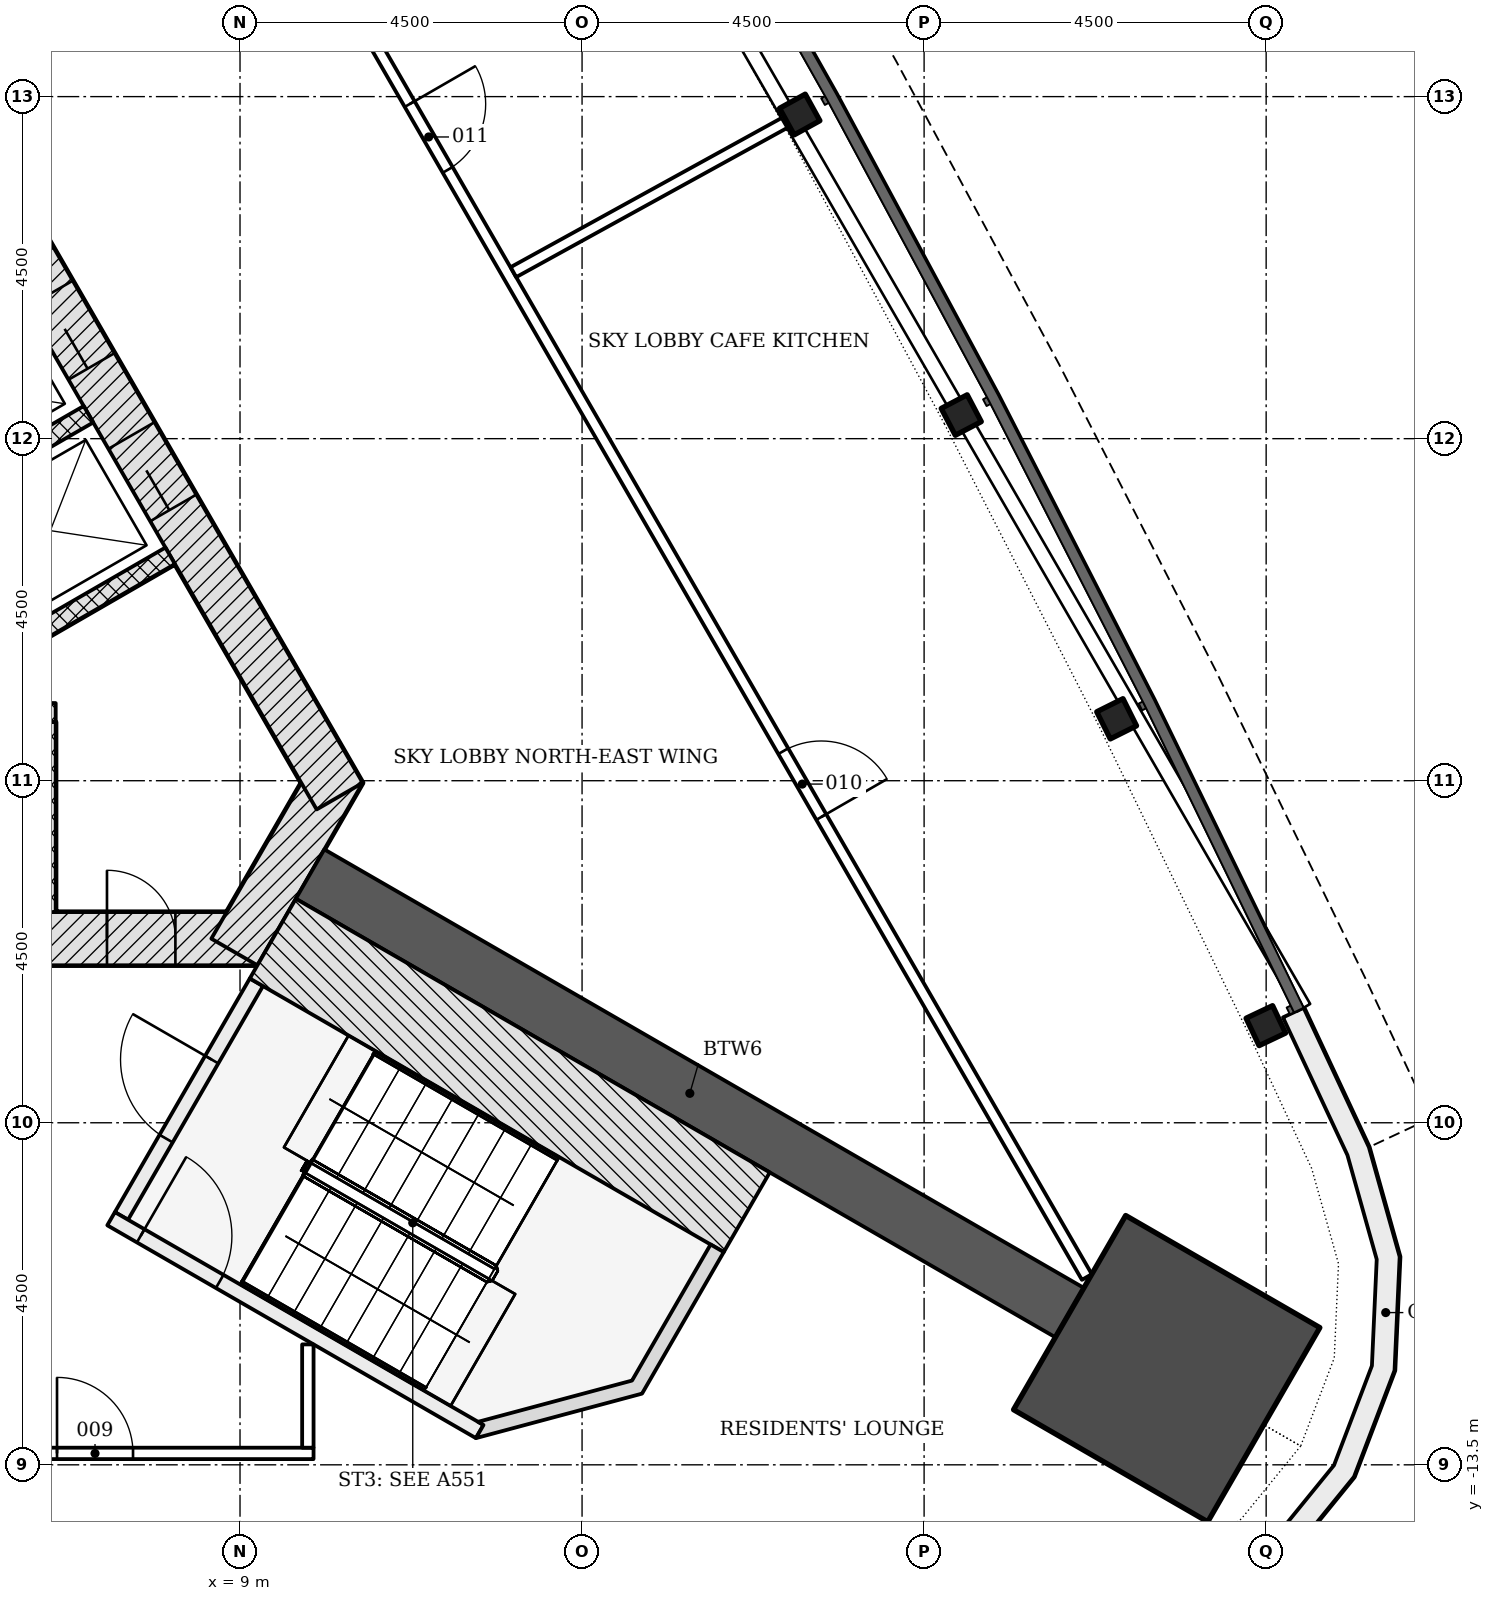
"""IFC4 building model, lengths in metres.
Left out: names, types, materials, properties, quantities, classifications, styles, units other than length and angle.
Written with IfcOpenShell. Run it as: python <this file> out.ifc"""

import sys

from ifc_helpers import new_model, si_unit, direction, frame, frame_2d, origin, origin_2d, place, context, subcontext, project, spatial, polyline, rectangle, i_section, outline, extrude, element, fill, save


model = new_model("IFC4")
c1 = context("Model", 3, precision=1e-05, world=origin(), true_north=direction((0.0, 1.0)))
c2 = subcontext(c1, "Body", "Model", "MODEL_VIEW")
j1 = project(units=[si_unit("LENGTHUNIT", "METRE"), si_unit("PLANEANGLEUNIT", "RADIAN")], contexts=[c1])
p1 = place(None, origin())
s1 = spatial("IfcSite", under=j1, at=p1, CompositionType="ELEMENT")
p2 = place(p1, origin())
s2 = spatial("IfcBuilding", under=s1, at=p2, CompositionType="ELEMENT")
p3 = place(p2, frame((0.0, 0.0, 134.7)))
s3 = spatial("IfcBuildingStorey", under=s2, at=p3, CompositionType="ELEMENT", Elevation=134.7)
p4 = place(p3, frame((-9.229, -6.578, -0.3), z_axis=(0.0, 0.0, 1.0), x_axis=(1.0, 0.0, 0.0)))
e1 = element("IfcWall", 1, at=p4, inside=s3, PredefinedType="SHEAR", context=c2, shape_type="SweptSolid", body=[
    extrude(rectangle(XDim=18.458, YDim=0.7, at=frame_2d((9.229, 0.0))), origin(), (0.0, 0.0, 1.0), 5.5),
])
p5 = place(p4, frame((3.304, 0.0, 0.3)))
e2 = element("IfcOpeningElement", 2, at=p5, cuts=e1, PredefinedType="OPENING", context=c2, shape_type="SweptSolid", body=[
    extrude(rectangle(XDim=1.1, YDim=2.1, at=frame_2d((0.55, 1.05))), frame((0.0, 0.36, 0.0), z_axis=(0.0, -1.0, 0.0), x_axis=(1.0, 0.0, 0.0)), (0.0, 0.0, 1.0), 0.72),
])
p6 = place(p4, frame((5.454, 0.0, 0.3)))
e3 = element("IfcOpeningElement", 3, at=p6, cuts=e1, PredefinedType="OPENING", context=c2, shape_type="SweptSolid", body=[
    extrude(rectangle(XDim=1.1, YDim=2.1, at=frame_2d((0.55, 1.05))), frame((0.0, 0.36, 0.0), z_axis=(0.0, -1.0, 0.0), x_axis=(1.0, 0.0, 0.0)), (0.0, 0.0, 1.0), 0.72),
])
p7 = place(p4, frame((7.604, 0.0, 0.3)))
e4 = element("IfcOpeningElement", 4, at=p7, cuts=e1, PredefinedType="OPENING", context=c2, shape_type="SweptSolid", body=[
    extrude(rectangle(XDim=1.1, YDim=2.1, at=frame_2d((0.55, 1.05))), frame((0.0, 0.36, 0.0), z_axis=(0.0, -1.0, 0.0), x_axis=(1.0, 0.0, 0.0)), (0.0, 0.0, 1.0), 0.72),
])
p8 = place(p4, frame((9.754, 0.0, 0.3)))
e5 = element("IfcOpeningElement", 5, at=p8, cuts=e1, PredefinedType="OPENING", context=c2, shape_type="SweptSolid", body=[
    extrude(rectangle(XDim=1.1, YDim=2.1, at=frame_2d((0.55, 1.05))), frame((0.0, 0.36, 0.0), z_axis=(0.0, -1.0, 0.0), x_axis=(1.0, 0.0, 0.0)), (0.0, 0.0, 1.0), 0.72),
])
p9 = place(p4, frame((11.904, 0.0, 0.3)))
e6 = element("IfcOpeningElement", 6, at=p9, cuts=e1, PredefinedType="OPENING", context=c2, shape_type="SweptSolid", body=[
    extrude(rectangle(XDim=1.1, YDim=2.1, at=frame_2d((0.55, 1.05))), frame((0.0, 0.36, 0.0), z_axis=(0.0, -1.0, 0.0), x_axis=(1.0, 0.0, 0.0)), (0.0, 0.0, 1.0), 0.72),
])
p10 = place(p4, frame((14.054, 0.0, 0.3)))
e7 = element("IfcOpeningElement", 7, at=p10, cuts=e1, PredefinedType="OPENING", context=c2, shape_type="SweptSolid", body=[
    extrude(rectangle(XDim=1.1, YDim=2.1, at=frame_2d((0.55, 1.05))), frame((0.0, 0.36, 0.0), z_axis=(0.0, -1.0, 0.0), x_axis=(1.0, 0.0, 0.0)), (0.0, 0.0, 1.0), 0.72),
])
p11 = place(p4, frame((1.0, 0.0, 0.3)))
e8 = element("IfcOpeningElement", 8, at=p11, cuts=e1, PredefinedType="OPENING", context=c2, shape_type="SweptSolid", body=[
    extrude(rectangle(XDim=1.0, YDim=2.1, at=frame_2d((0.5, 1.05))), frame((0.0, 0.36, 0.0), z_axis=(0.0, -1.0, 0.0), x_axis=(1.0, 0.0, 0.0)), (0.0, 0.0, 1.0), 0.72),
])
p12 = place(p4, frame((16.479, 0.0, 0.3)))
e9 = element("IfcOpeningElement", 9, at=p12, cuts=e1, PredefinedType="OPENING", context=c2, shape_type="SweptSolid", body=[
    extrude(rectangle(XDim=0.9, YDim=2.1, at=frame_2d((0.45, 1.05))), frame((0.0, 0.36, 0.0), z_axis=(0.0, -1.0, 0.0), x_axis=(1.0, 0.0, 0.0)), (0.0, 0.0, 1.0), 0.72),
])
p13 = place(p3, frame((8.926, -6.753, -0.3), z_axis=(0.0, 0.0, 1.0), x_axis=(0.500042739161, 0.866000726912, 0.0)))
e10 = element("IfcWall", 10, at=p13, inside=s3, PredefinedType="SHEAR", context=c2, shape_type="SweptSolid", body=[
    extrude(rectangle(XDim=2.771, YDim=0.7, at=frame_2d((1.386, 0.0))), origin(), (0.0, 0.0, 1.0), 5.5),
])
p14 = place(p3, frame((10.311, -4.703, -0.3), z_axis=(0.0, 0.0, 1.0), x_axis=(-0.500001446645, 0.866024568562, 0.0)))
e11 = element("IfcWall", 11, at=p14, inside=s3, PredefinedType="SHEAR", context=c2, shape_type="SweptSolid", body=[
    extrude(rectangle(XDim=18.458, YDim=0.7, at=frame_2d((9.229, 0.0))), origin(), (0.0, 0.0, 1.0), 5.5),
])
p15 = place(p14, frame((4.379, 0.0, 0.3)))
e12 = element("IfcOpeningElement", 12, at=p15, cuts=e11, PredefinedType="OPENING", context=c2, shape_type="SweptSolid", body=[
    extrude(rectangle(XDim=1.1, YDim=2.1, at=frame_2d((0.55, 1.05))), frame((0.0, 0.36, 0.0), z_axis=(0.0, -1.0, 0.0), x_axis=(1.0, 0.0, 0.0)), (0.0, 0.0, 1.0), 0.72),
])
p16 = place(p14, frame((6.529, 0.0, 0.3)))
e13 = element("IfcOpeningElement", 13, at=p16, cuts=e11, PredefinedType="OPENING", context=c2, shape_type="SweptSolid", body=[
    extrude(rectangle(XDim=1.1, YDim=2.1, at=frame_2d((0.55, 1.05))), frame((0.0, 0.36, 0.0), z_axis=(0.0, -1.0, 0.0), x_axis=(1.0, 0.0, 0.0)), (0.0, 0.0, 1.0), 0.72),
])
p17 = place(p14, frame((8.679, 0.0, 0.3)))
e14 = element("IfcOpeningElement", 14, at=p17, cuts=e11, PredefinedType="OPENING", context=c2, shape_type="SweptSolid", body=[
    extrude(rectangle(XDim=1.1, YDim=2.1, at=frame_2d((0.55, 1.05))), frame((0.0, 0.36, 0.0), z_axis=(0.0, -1.0, 0.0), x_axis=(1.0, 0.0, 0.0)), (0.0, 0.0, 1.0), 0.72),
])
p18 = place(p14, frame((10.829, 0.0, 0.3)))
e15 = element("IfcOpeningElement", 15, at=p18, cuts=e11, PredefinedType="OPENING", context=c2, shape_type="SweptSolid", body=[
    extrude(rectangle(XDim=1.1, YDim=2.1, at=frame_2d((0.55, 1.05))), frame((0.0, 0.36, 0.0), z_axis=(0.0, -1.0, 0.0), x_axis=(1.0, 0.0, 0.0)), (0.0, 0.0, 1.0), 0.72),
])
p19 = place(p14, frame((12.979, 0.0, 0.3)))
e16 = element("IfcOpeningElement", 16, at=p19, cuts=e11, PredefinedType="OPENING", context=c2, shape_type="SweptSolid", body=[
    extrude(rectangle(XDim=1.1, YDim=2.1, at=frame_2d((0.55, 1.05))), frame((0.0, 0.36, 0.0), z_axis=(0.0, -1.0, 0.0), x_axis=(1.0, 0.0, 0.0)), (0.0, 0.0, 1.0), 0.72),
])
p20 = place(p3, frame((9.922, -5.728, -0.3), z_axis=(0.0, 0.0, 1.0), x_axis=(0.866024913782, -0.500000848707, 0.0)))
e17 = element("IfcWall", 17, at=p20, inside=s3, PredefinedType="SHEAR", context=c2, shape_type="SweptSolid", body=[
    extrude(rectangle(XDim=11.539, YDim=0.75, at=frame_2d((5.769, 0.0))), origin(), (0.0, 0.0, 1.0), 5.5),
])
p21 = place(p3, frame((21.192, -12.235, -0.3), z_axis=(0.0, 0.0, 1.0), x_axis=(0.866025403784, -0.5, 0.0)))
e18 = element("IfcColumn", 18, at=p21, inside=s3, PredefinedType="COLUMN", context=c2, shape_type="SweptSolid", body=[
    extrude(rectangle(XDim=2.95, YDim=2.95, at=origin_2d()), origin(), (0.0, 0.0, 1.0), 5.5),
])
for number, where, z_axis, x_axis in (
    (19, (22.496, -7.722, -0.3), (0.0, 0.0, 1.0), (-0.428, 0.904, 0.0)),
    (20, (20.533, -3.686, -0.3), (0.0, 0.0, 1.0), (-0.446, 0.895, 0.0)),
    (21, (18.489, 0.311, -0.3), (0.0, 0.0, 1.0), (-0.464, 0.886, 0.0)),
    (22, (16.364, 4.265, -0.3), (0.0, 0.0, 1.0), (-0.482, 0.876, 0.0)),
):
    element("IfcColumn", number, at=place(p3, frame(where, z_axis=z_axis, x_axis=x_axis)), inside=s3, PredefinedType="COLUMN", context=c2, shape_type="SweptSolid", body=[
        extrude(i_section(OverallWidth=0.399, OverallDepth=0.386, WebThickness=0.021, FlangeThickness=0.033, FilletRadius=0.015, at=origin_2d()), origin(), (0.0, 0.0, 1.0), 5.5),
    ])
p22 = place(p3, origin())
e23 = element("IfcWall", 23, at=p22, inside=s3, PredefinedType="NOTDEFINED", context=c2, shape_type="SweptSolid", body=[
    extrude(outline(polyline([(17.98, -16.169), (19.999, -15.995), (21.449, -15.625), (22.711, -14.819), (23.656, -13.658), (24.189, -12.259), (24.257, -10.763), (23.852, -9.322), (22.993, -7.487), (22.721, -7.614), (23.57, -9.426), (23.955, -10.798), (23.891, -12.197), (23.393, -13.506), (22.509, -14.592), (21.328, -15.347), (19.948, -15.699), (17.955, -15.87), (17.98, -16.169)])), origin(), (0.0, 0.0, 1.0), 5.2),
])
p23 = place(p3, frame((6.45, -6.228, -0.3), z_axis=(0.0, 0.0, 1.0), x_axis=(0.0, 1.0, 0.0)))
e24 = element("IfcWall", 24, at=p23, inside=s3, PredefinedType="PARTITIONING", context=c2, shape_type="SweptSolid", body=[
    extrude(rectangle(XDim=2.5, YDim=0.25, at=frame_2d((1.25, 0.0))), origin(), (0.0, 0.0, 1.0), 5.5),
])
p24 = place(p3, frame((-6.575, -3.603, 0.0), z_axis=(0.0, 0.0, 1.0), x_axis=(1.0, 0.0, 0.0)))
e25 = element("IfcWall", 25, at=p24, inside=s3, PredefinedType="PARTITIONING", context=c2, shape_type="SweptSolid", body=[
    extrude(rectangle(XDim=13.15, YDim=0.25, at=frame_2d((6.575, 0.0))), origin(), (0.0, 0.0, 1.0), 5.2),
])
for number, where, z_axis, x_axis in (
    (26, (8.081, -1.541, -0.3), (0.0, 0.0, 1.0), (-0.866, -0.5, 0.0)),
    (27, (7.006, 0.321, -0.3), (0.0, 0.0, 1.0), (-0.866, -0.5, 0.0)),
):
    element("IfcWall", number, at=place(p3, frame(where, z_axis=z_axis, x_axis=x_axis)), inside=s3, PredefinedType="PARTITIONING", context=c2, shape_type="SweptSolid", body=[
        extrude(rectangle(XDim=2.5, YDim=0.25, at=frame_2d((1.25, 0.0))), origin(), (0.0, 0.0, 1.0), 5.5),
    ])
p25 = place(p3, frame((7.44, -10.226, -0.3), z_axis=(0.0, 0.0, 1.0), x_axis=(0.500022077904, 0.866012656725, 0.0)))
e28 = element("IfcWall", 28, at=p25, inside=s3, PredefinedType="SHEAR", context=c2, shape_type="SweptSolid", body=[
    extrude(rectangle(XDim=3.55, YDim=0.2, at=frame_2d((1.775, 0.0))), origin(), (0.0, 0.0, 1.0), 5.5),
])
p26 = place(p25, frame((1.175, 0.0, 0.3)))
e29 = element("IfcOpeningElement", 29, at=p26, cuts=e28, PredefinedType="OPENING", context=c2, shape_type="SweptSolid", body=[
    extrude(rectangle(XDim=1.2, YDim=2.1, at=frame_2d((0.6, 1.05))), frame((0.0, 0.11, 0.0), z_axis=(0.0, -1.0, 0.0), x_axis=(1.0, 0.0, 0.0)), (0.0, 0.0, 1.0), 0.22),
])
p27 = place(p3, frame((7.304, -10.262, -0.3), z_axis=(0.0, 0.0, 1.0), x_axis=(0.866026594901, -0.49999793692, 0.0)))
e30 = element("IfcWall", 30, at=p27, inside=s3, PredefinedType="SHEAR", context=c2, shape_type="SweptSolid", body=[
    extrude(rectangle(XDim=5.6, YDim=0.2, at=frame_2d((2.8, 0.0))), origin(), (0.0, 0.0, 1.0), 5.5),
])
p28 = place(p27, frame((0.45, 0.0, 0.3)))
e31 = element("IfcOpeningElement", 31, at=p28, cuts=e30, PredefinedType="OPENING", context=c2, shape_type="SweptSolid", body=[
    extrude(rectangle(XDim=1.2, YDim=2.1, at=frame_2d((0.6, 1.05))), frame((0.0, 0.11, 0.0), z_axis=(0.0, -1.0, 0.0), x_axis=(1.0, 0.0, 0.0)), (0.0, 0.0, 1.0), 0.22),
])
p29 = place(p3, frame((9.431, -6.577, -0.3), z_axis=(0.0, 0.0, 1.0), x_axis=(0.866018442252, -0.500012057535, 0.0)))
e32 = element("IfcWall", 32, at=p29, inside=s3, PredefinedType="SHEAR", context=c2, shape_type="SweptSolid", body=[
    extrude(rectangle(XDim=7.2, YDim=1.211, at=frame_2d((3.6, 0.0))), origin(), (0.0, 0.0, 1.0), 5.5),
])
p30 = place(p3, frame((0.0, 0.0, -0.3)))
e33 = element("IfcWall", 33, at=p30, inside=s3, PredefinedType="SHEAR", context=c2, shape_type="SweptSolid", body=[
    extrude(outline(polyline([(12.104, -13.149), (14.289, -12.563), (15.364, -10.701), (15.191, -10.601), (14.157, -12.392), (12.132, -12.934), (12.204, -12.976), (12.204, -12.976), (12.204, -12.976), (12.204, -12.976), (12.204, -12.976), (12.204, -12.976), (12.204, -12.976), (12.204, -12.976), (12.204, -12.976), (12.204, -12.976), (12.204, -12.976), (12.204, -12.976), (12.204, -12.976), (12.204, -12.976), (12.204, -12.976), (12.204, -12.976), (12.204, -12.976), (12.104, -13.149)])), origin(), (0.0, 0.0, 1.0), 5.5),
])
p31 = place(p3, frame((5.909, -13.35, 0.0), z_axis=(0.0, 0.0, 1.0), x_axis=(1.0, 0.0, 0.0)))
e34 = element("IfcWall", 34, at=p31, inside=s3, PredefinedType="PARTITIONING", context=c2, shape_type="SweptSolid", body=[
    extrude(rectangle(XDim=4.059, YDim=0.15, at=frame_2d((2.029, 0.0))), origin(), (0.0, 0.0, 1.0), 4.723),
])
p32 = place(p31, frame((0.684, 0.0, 0.0)))
e35 = element("IfcOpeningElement", 35, at=p32, cuts=e34, PredefinedType="OPENING", context=c2, shape_type="SweptSolid", body=[
    extrude(rectangle(XDim=1.0, YDim=2.1, at=frame_2d((0.5, 1.05))), frame((0.0, 0.085, 0.0), z_axis=(0.0, -1.0, 0.0), x_axis=(1.0, 0.0, 0.0)), (0.0, 0.0, 1.0), 0.17),
])
p33 = place(p3, frame((9.893, -13.275, 0.0), z_axis=(0.0, 0.0, 1.0), x_axis=(0.0, 1.0, 0.0)))
e36 = element("IfcWall", 36, at=p33, inside=s3, PredefinedType="PARTITIONING", context=c2, shape_type="SweptSolid", body=[
    extrude(rectangle(XDim=1.359, YDim=0.15, at=frame_2d((0.68, 0.0))), origin(), (0.0, 0.0, 1.0), 5.2),
])
p34 = place(p3, frame((7.377, 11.079, 0.0), z_axis=(0.0, 0.0, 1.0), x_axis=(0.500006395474, -0.866021711325, 0.0)))
e37 = element("IfcWall", 37, at=p34, inside=s3, PredefinedType="PARTITIONING", context=c2, shape_type="SweptSolid", body=[
    extrude(rectangle(XDim=25.529, YDim=0.15, at=frame_2d((12.765, 0.0))), origin(), (0.0, 0.0, 1.0), 4.647),
])
p35 = place(p34, frame((17.541, 0.0, 0.0)))
e38 = element("IfcOpeningElement", 38, at=p35, cuts=e37, PredefinedType="OPENING", context=c2, shape_type="SweptSolid", body=[
    extrude(rectangle(XDim=1.0, YDim=2.1, at=frame_2d((0.5, 1.05))), frame((0.0, 0.085, 0.0), z_axis=(0.0, -1.0, 0.0), x_axis=(1.0, 0.0, 0.0)), (0.0, 0.0, 1.0), 0.17),
])
p36 = place(p34, frame((7.71, 0.0, 0.0)))
e39 = element("IfcOpeningElement", 39, at=p36, cuts=e37, PredefinedType="OPENING", context=c2, shape_type="SweptSolid", body=[
    extrude(rectangle(XDim=1.0, YDim=2.1, at=frame_2d((0.5, 1.05))), frame((0.0, 0.085, 0.0), z_axis=(0.0, -1.0, 0.0), x_axis=(1.0, 0.0, 0.0)), (0.0, 0.0, 1.0), 0.17),
])
p37 = place(p34, frame((3.311, 0.0, 0.0)))
e40 = element("IfcOpeningElement", 40, at=p37, cuts=e37, PredefinedType="OPENING", context=c2, shape_type="SweptSolid", body=[
    extrude(rectangle(XDim=1.0, YDim=2.1, at=frame_2d((0.5, 1.05))), frame((0.0, 0.085, 0.0), z_axis=(0.0, -1.0, 0.0), x_axis=(1.0, 0.0, 0.0)), (0.0, 0.0, 1.0), 0.17),
])
p38 = place(p3, frame((12.597, 2.191, 0.0), z_axis=(0.0, 0.0, 1.0), x_axis=(0.875990873932, 0.482327677816, 0.0)))
e41 = element("IfcWall", 41, at=p38, inside=s3, PredefinedType="PARTITIONING", context=c2, shape_type="SweptSolid", body=[
    extrude(rectangle(XDim=4.125, YDim=0.15, at=frame_2d((2.062, 0.0))), origin(), (0.0, 0.0, 1.0), 4.647),
])
p39 = place(p15, origin())
e42 = element("IfcDoor", 42, at=p39, inside=s3, OperationType="DOUBLE_DOOR_SLIDING", PredefinedType="DOOR", context=c2, shape_type="SweptSolid", body=[
    extrude(rectangle(XDim=1.1, YDim=2.1, at=frame_2d((0.55, 1.05))), frame((0.0, 0.025, 0.0), z_axis=(0.0, -1.0, 0.0), x_axis=(1.0, 0.0, 0.0)), (0.0, 0.0, 1.0), 0.05),
])
fill(e12, e42)
p40 = place(p16, origin())
e43 = element("IfcDoor", 43, at=p40, inside=s3, OperationType="DOUBLE_DOOR_SLIDING", PredefinedType="DOOR", context=c2, shape_type="SweptSolid", body=[
    extrude(rectangle(XDim=1.1, YDim=2.1, at=frame_2d((0.55, 1.05))), frame((0.0, 0.025, 0.0), z_axis=(0.0, -1.0, 0.0), x_axis=(1.0, 0.0, 0.0)), (0.0, 0.0, 1.0), 0.05),
])
fill(e13, e43)
p41 = place(p12, origin())
e44 = element("IfcDoor", 44, at=p41, inside=s3, OperationType="SINGLE_SWING_LEFT", PredefinedType="DOOR", context=c2, shape_type="SweptSolid", body=[
    extrude(rectangle(XDim=0.9, YDim=2.1, at=frame_2d((0.45, 1.05))), frame((0.0, 0.075, 0.0), z_axis=(0.0, -1.0, 0.0), x_axis=(1.0, 0.0, 0.0)), (0.0, 0.0, 1.0), 0.15),
])
fill(e9, e44)
p42 = place(p26, origin())
e45 = element("IfcDoor", 45, at=p42, inside=s3, OperationType="SINGLE_SWING_RIGHT", PredefinedType="DOOR", context=c2, shape_type="SweptSolid", body=[
    extrude(rectangle(XDim=1.2, YDim=2.1, at=frame_2d((0.6, 1.05))), frame((0.0, 0.025, 0.0), z_axis=(0.0, -1.0, 0.0), x_axis=(1.0, 0.0, 0.0)), (0.0, 0.0, 1.0), 0.05),
])
fill(e29, e45)
p43 = place(p28, origin())
e46 = element("IfcDoor", 46, at=p43, inside=s3, OperationType="SINGLE_SWING_LEFT", PredefinedType="DOOR", context=c2, shape_type="SweptSolid", body=[
    extrude(rectangle(XDim=1.2, YDim=2.1, at=frame_2d((0.6, 1.05))), frame((0.0, 0.025, 0.0), z_axis=(0.0, -1.0, 0.0), x_axis=(1.0, 0.0, 0.0)), (0.0, 0.0, 1.0), 0.05),
])
fill(e31, e46)
p44 = place(p32, origin())
e47 = element("IfcDoor", 47, at=p44, inside=s3, OperationType="SINGLE_SWING_LEFT", PredefinedType="DOOR", context=c2, shape_type="SweptSolid", body=[
    extrude(rectangle(XDim=1.0, YDim=2.1, at=frame_2d((0.5, 1.05))), frame((0.0, 0.025, 0.0), z_axis=(0.0, -1.0, 0.0), x_axis=(1.0, 0.0, 0.0)), (0.0, 0.0, 1.0), 0.05),
])
fill(e35, e47)
p45 = place(p35, origin())
e48 = element("IfcDoor", 48, at=p45, inside=s3, OperationType="SINGLE_SWING_RIGHT", PredefinedType="DOOR", context=c2, shape_type="SweptSolid", body=[
    extrude(rectangle(XDim=1.0, YDim=2.1, at=frame_2d((0.5, 1.05))), frame((0.0, 0.025, 0.0), z_axis=(0.0, -1.0, 0.0), x_axis=(1.0, 0.0, 0.0)), (0.0, 0.0, 1.0), 0.05),
])
fill(e38, e48)
p46 = place(p36, origin())
e49 = element("IfcDoor", 49, at=p46, inside=s3, OperationType="SINGLE_SWING_LEFT", PredefinedType="DOOR", context=c2, shape_type="SweptSolid", body=[
    extrude(rectangle(XDim=1.0, YDim=2.1, at=frame_2d((0.5, 1.05))), frame((0.0, 0.025, 0.0), z_axis=(0.0, -1.0, 0.0), x_axis=(1.0, 0.0, 0.0)), (0.0, 0.0, 1.0), 0.05),
])
fill(e39, e49)
save(model, sys.argv[1])
